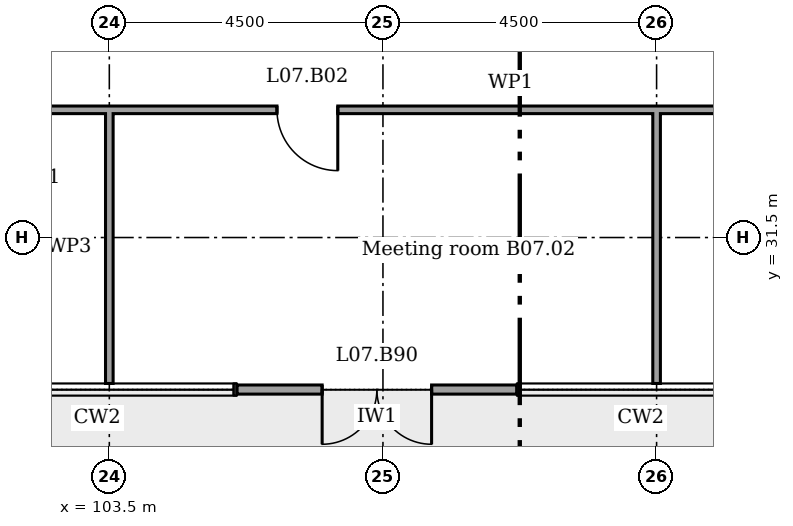
"""IFC4 building model, lengths in metres.
Left out: names, types, materials, properties, quantities, classifications, styles, units other than length and angle.
Written with IfcOpenShell. Run it as: python <this file> out.ifc"""

import sys

from ifc_helpers import new_model, si_unit, direction, frame, frame_2d, origin, place, context, subcontext, project, spatial, rectangle, extrude, element, fill, save


model = new_model("IFC4")
c1 = context("Model", 3, precision=1e-05, world=origin(), true_north=direction((0.0, 1.0)))
c2 = subcontext(c1, "Body", "Model", "MODEL_VIEW")
j1 = project(units=[si_unit("LENGTHUNIT", "METRE"), si_unit("PLANEANGLEUNIT", "RADIAN")], contexts=[c1])
p1 = place(None, origin())
s1 = spatial("IfcSite", under=j1, at=p1, CompositionType="ELEMENT")
p2 = place(p1, origin())
s2 = spatial("IfcBuilding", under=s1, at=p2, CompositionType="ELEMENT")
p3 = place(p2, frame((0.0, 0.0, 34.2)))
s3 = spatial("IfcBuildingStorey", under=s2, at=p3, CompositionType="ELEMENT", Elevation=34.2)
p4 = place(p3, frame((105.6, 29.0, 0.0)))
e1 = element("IfcWall", 1, at=p4, inside=s3, PredefinedType="SOLIDWALL", context=c2, shape_type="SweptSolid", body=[
    extrude(rectangle(XDim=4.6, YDim=0.15, at=frame_2d((2.3, 0.0))), origin(), (0.0, 0.0, 1.0), 4.225),
])
p5 = place(p4, frame((1.4, 0.0, 0.0)))
e2 = element("IfcOpeningElement", 2, at=p5, cuts=e1, PredefinedType="OPENING", context=c2, shape_type="SweptSolid", body=[
    extrude(rectangle(XDim=1.8, YDim=2.4, at=frame_2d((0.9, 1.2))), frame((0.0, 0.085, 0.0), z_axis=(0.0, -1.0, 0.0), x_axis=(1.0, 0.0, 0.0)), (0.0, 0.0, 1.0), 0.17),
])
p6 = place(p3, frame((100.438, 33.6, 0.0)))
e3 = element("IfcWall", 3, at=p6, inside=s3, PredefinedType="PARTITIONING", context=c2, shape_type="SweptSolid", body=[
    extrude(rectangle(XDim=19.325, YDim=0.125, at=frame_2d((9.663, 0.0))), origin(), (0.0, 0.0, 1.0), 4.225),
])
p7 = place(p6, frame((5.82, 0.0, 0.0)))
e4 = element("IfcOpeningElement", 4, at=p7, cuts=e3, PredefinedType="OPENING", context=c2, shape_type="SweptSolid", body=[
    extrude(rectangle(XDim=1.0, YDim=2.1, at=frame_2d((0.5, 1.05))), frame((0.0, 0.073, 0.0), z_axis=(0.0, -1.0, 0.0), x_axis=(1.0, 0.0, 0.0)), (0.0, 0.0, 1.0), 0.145),
])
p8 = place(p6, frame((15.686, 0.0, 0.0)))
e5 = element("IfcOpeningElement", 5, at=p8, cuts=e3, PredefinedType="OPENING", context=c2, shape_type="SweptSolid", body=[
    extrude(rectangle(XDim=1.0, YDim=2.1, at=frame_2d((0.5, 1.05))), frame((0.0, 0.073, 0.0), z_axis=(0.0, -1.0, 0.0), x_axis=(1.0, 0.0, 0.0)), (0.0, 0.0, 1.0), 0.145),
])
p9 = place(p3, frame((103.5, 29.1, 0.0), z_axis=(0.0, 0.0, 1.0), x_axis=(0.0, 1.0, 0.0)))
e6 = element("IfcWall", 6, at=p9, inside=s3, PredefinedType="MOVABLE", context=c2, shape_type="SweptSolid", body=[
    extrude(rectangle(XDim=4.5, YDim=0.125, at=frame_2d((2.25, 0.0))), origin(), (0.0, 0.0, 1.0), 3.613),
])
p10 = place(p3, frame((112.5, 29.1, 0.0), z_axis=(0.0, 0.0, 1.0), x_axis=(0.0, 1.0, 0.0)))
e7 = element("IfcWall", 7, at=p10, inside=s3, PredefinedType="PARTITIONING", context=c2, shape_type="SweptSolid", body=[
    extrude(rectangle(XDim=4.5, YDim=0.125, at=frame_2d((2.25, 0.0))), origin(), (0.0, 0.0, 1.0), 3.613),
])
p11 = place(p5, frame((1.8, 0.0, 0.0), x_axis=(-1.0, 0.0, 0.0)))
e8 = element("IfcDoor", 8, at=p11, inside=s3, OperationType="DOUBLE_DOOR_DOUBLE_SWING", PredefinedType="NOTDEFINED", context=c2, shape_type="SweptSolid", body=[
    extrude(rectangle(XDim=1.8, YDim=2.4, at=frame_2d((0.9, 1.2))), frame((0.0, 0.025, 0.0), z_axis=(0.0, -1.0, 0.0), x_axis=(1.0, 0.0, 0.0)), (0.0, 0.0, 1.0), 0.05),
])
fill(e2, e8)
p12 = place(p7, frame((1.0, 0.0, 0.0), x_axis=(-1.0, 0.0, 0.0)))
e9 = element("IfcDoor", 9, at=p12, inside=s3, OperationType="SINGLE_SWING_RIGHT", PredefinedType="DOOR", context=c2, shape_type="SweptSolid", body=[
    extrude(rectangle(XDim=1.0, YDim=2.1, at=frame_2d((0.5, 1.05))), frame((0.0, 0.025, 0.0), z_axis=(0.0, -1.0, 0.0), x_axis=(1.0, 0.0, 0.0)), (0.0, 0.0, 1.0), 0.05),
])
fill(e4, e9)
save(model, sys.argv[1])
